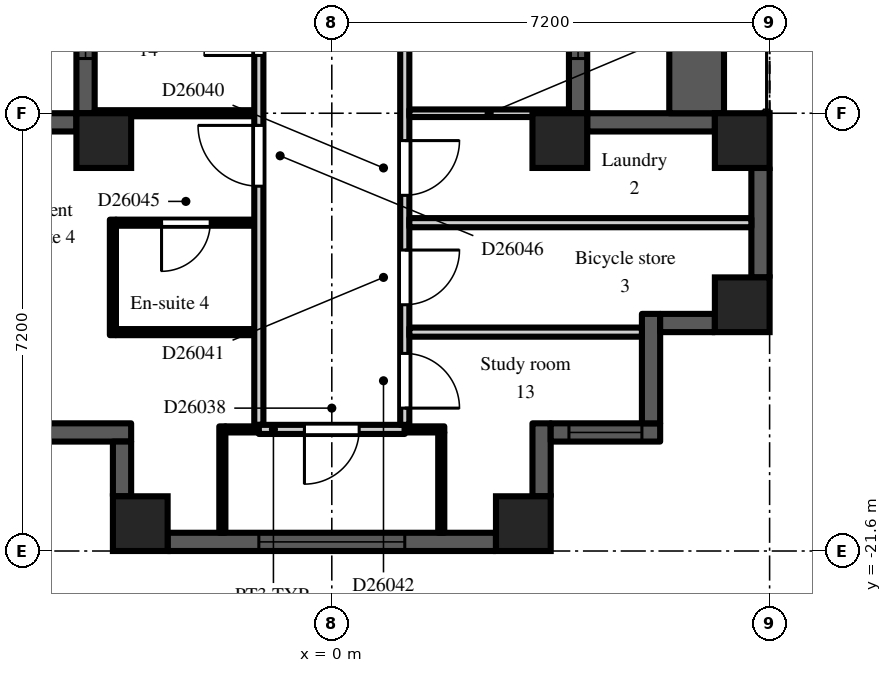
"""IFC4 building model, lengths in metres.
Left out: names, types, materials, properties, quantities, classifications, styles, units other than length and angle.
Written with IfcOpenShell. Run it as: python <this file> out.ifc"""

import sys

from ifc_helpers import new_model, si_unit, direction, frame, frame_2d, origin, origin_2d, place, context, subcontext, project, spatial, rectangle, extrude, element, fill, save


model = new_model("IFC4")
c1 = context("Model", 3, precision=1e-05, world=origin(), true_north=direction((0.0, 1.0)))
c2 = subcontext(c1, "Body", "Model", "MODEL_VIEW")
j1 = project(units=[si_unit("LENGTHUNIT", "METRE"), si_unit("PLANEANGLEUNIT", "RADIAN")], contexts=[c1])
p1 = place(None, origin())
s1 = spatial("IfcSite", under=j1, at=p1, CompositionType="ELEMENT")
p2 = place(p1, origin())
s2 = spatial("IfcBuilding", under=s1, at=p2, CompositionType="ELEMENT")
p3 = place(p2, frame((0.0, 0.0, 179.7)))
s3 = spatial("IfcBuildingStorey", under=s2, at=p3, CompositionType="ELEMENT", Elevation=179.7)
for number, where, z_axis, x_axis in (
    (1, (-3.75, -14.85, 0.0), (0.0, 0.0, 1.0), (1.0, 0.0, 0.0)),
    (2, (-3.15, -21.15, 0.0), (0.0, 0.0, 1.0), (1.0, 0.0, 0.0)),
    (3, (3.15, -21.15, 0.0), (0.0, 0.0, 1.0), (1.0, 0.0, 0.0)),
    (4, (3.75, -14.85, 0.0), (0.0, 0.0, 1.0), (1.0, 0.0, 0.0)),
    (5, (6.75, -17.55, 0.0), (0.0, 0.0, 1.0), (1.0, 0.0, 0.0)),
    (6, (6.75, -14.85, 0.0), (0.0, 0.0, 1.0), (1.0, 0.0, 0.0)),
):
    element("IfcColumn", number, at=place(p3, frame(where, z_axis=z_axis, x_axis=x_axis)), inside=s3, PredefinedType="COLUMN", context=c2, shape_type="SweptSolid", body=[
        extrude(rectangle(XDim=0.9, YDim=0.9, at=origin_2d()), origin(), (0.0, 0.0, 1.0), 3.0),
    ])
p4 = place(p3, frame((-4.05, -7.2, 0.0), z_axis=(0.0, 0.0, 1.0), x_axis=(0.0, -1.0, 0.0)))
e7 = element("IfcWall", 7, at=p4, inside=s3, PredefinedType="SOLIDWALL", context=c2, shape_type="SweptSolid", body=[
    extrude(rectangle(XDim=7.2, YDim=0.3, at=frame_2d((3.6, 0.0))), origin(), (0.0, 0.0, 1.0), 2.2),
])
p5 = place(p4, frame((3.0, 0.0, 0.0)))
e8 = element("IfcOpeningElement", 8, at=p5, cuts=e7, PredefinedType="OPENING", context=c2, shape_type="SweptSolid", body=[
    extrude(rectangle(XDim=1.2, YDim=2.05, at=frame_2d((0.6, 1.025))), frame((0.0, 0.16, 0.0), z_axis=(0.0, -1.0, 0.0), x_axis=(1.0, 0.0, 0.0)), (0.0, 0.0, 1.0), 0.32),
])
p6 = place(p4, frame((0.9, 0.0, 0.2)))
e9 = element("IfcOpeningElement", 9, at=p6, cuts=e7, PredefinedType="OPENING", context=c2, shape_type="SweptSolid", body=[
    extrude(rectangle(XDim=1.8, YDim=1.85, at=frame_2d((0.9, 0.925))), frame((0.0, 0.16, 0.0), z_axis=(0.0, -1.0, 0.0), x_axis=(1.0, 0.0, 0.0)), (0.0, 0.0, 1.0), 0.32),
])
p7 = place(p4, frame((4.5, 0.0, 0.2)))
e10 = element("IfcOpeningElement", 10, at=p7, cuts=e7, PredefinedType="OPENING", context=c2, shape_type="SweptSolid", body=[
    extrude(rectangle(XDim=1.8, YDim=1.85, at=frame_2d((0.9, 0.925))), frame((0.0, 0.16, 0.0), z_axis=(0.0, -1.0, 0.0), x_axis=(1.0, 0.0, 0.0)), (0.0, 0.0, 1.0), 0.32),
])
p8 = place(p3, frame((-4.2, -14.55, 0.0), z_axis=(0.0, 0.0, 1.0), x_axis=(-1.0, 0.0, 0.0)))
e11 = element("IfcWall", 11, at=p8, inside=s3, PredefinedType="SOLIDWALL", context=c2, shape_type="SweptSolid", body=[
    extrude(rectangle(XDim=2.1, YDim=0.3, at=frame_2d((1.05, 0.0))), origin(), (0.0, 0.0, 1.0), 2.2),
])
p9 = place(p3, frame((-5.1, -19.65, 0.0), z_axis=(0.0, 0.0, 1.0), x_axis=(1.0, 0.0, 0.0)))
e12 = element("IfcWall", 12, at=p9, inside=s3, PredefinedType="SOLIDWALL", context=c2, shape_type="SweptSolid", body=[
    extrude(rectangle(XDim=1.8, YDim=0.3, at=frame_2d((0.9, 0.0))), origin(), (0.0, 0.0, 1.0), 2.6),
])
p10 = place(p3, frame((-3.45, -19.8, 0.0), z_axis=(0.0, 0.0, 1.0), x_axis=(0.0, -1.0, 0.0)))
e13 = element("IfcWall", 13, at=p10, inside=s3, PredefinedType="SOLIDWALL", context=c2, shape_type="SweptSolid", body=[
    extrude(rectangle(XDim=0.9, YDim=0.3, at=frame_2d((0.45, 0.0))), origin(), (0.0, 0.0, 1.0), 2.6),
])
p11 = place(p3, frame((-2.7, -21.45, 0.0), z_axis=(0.0, 0.0, 1.0), x_axis=(1.0, 0.0, 0.0)))
e14 = element("IfcWall", 14, at=p11, inside=s3, PredefinedType="SOLIDWALL", context=c2, shape_type="SweptSolid", body=[
    extrude(rectangle(XDim=5.4, YDim=0.3, at=frame_2d((2.7, 0.0))), origin(), (0.0, 0.0, 1.0), 2.2),
])
p12 = place(p11, frame((1.5, 0.0, 0.2)))
e15 = element("IfcOpeningElement", 15, at=p12, cuts=e14, PredefinedType="OPENING", context=c2, shape_type="SweptSolid", body=[
    extrude(rectangle(XDim=2.4, YDim=1.85, at=frame_2d((1.2, 0.925))), frame((0.0, 0.16, 0.0), z_axis=(0.0, -1.0, 0.0), x_axis=(1.0, 0.0, 0.0)), (0.0, 0.0, 1.0), 0.32),
])
p13 = place(p3, frame((3.45, -20.7, 0.0), z_axis=(0.0, 0.0, 1.0), x_axis=(0.0, 1.0, 0.0)))
e16 = element("IfcWall", 16, at=p13, inside=s3, PredefinedType="SOLIDWALL", context=c2, shape_type="SweptSolid", body=[
    extrude(rectangle(XDim=1.2, YDim=0.3, at=frame_2d((0.6, 0.0))), origin(), (0.0, 0.0, 1.0), 2.6),
])
p14 = place(p3, frame((3.6, -19.65, 0.0), z_axis=(0.0, 0.0, 1.0), x_axis=(1.0, 0.0, 0.0)))
e17 = element("IfcWall", 17, at=p14, inside=s3, PredefinedType="SOLIDWALL", context=c2, shape_type="SweptSolid", body=[
    extrude(rectangle(XDim=1.8, YDim=0.3, at=frame_2d((0.9, 0.0))), origin(), (0.0, 0.0, 1.0), 2.6),
])
p15 = place(p14, frame((0.3, 0.0, 0.2)))
e18 = element("IfcOpeningElement", 18, at=p15, cuts=e17, PredefinedType="OPENING", context=c2, shape_type="SweptSolid", body=[
    extrude(rectangle(XDim=1.2, YDim=1.85, at=frame_2d((0.6, 0.925))), frame((0.0, 0.16, 0.0), z_axis=(0.0, -1.0, 0.0), x_axis=(1.0, 0.0, 0.0)), (0.0, 0.0, 1.0), 0.32),
])
p16 = place(p3, frame((5.25, -19.5, 0.0), z_axis=(0.0, 0.0, 1.0), x_axis=(0.0, 1.0, 0.0)))
e19 = element("IfcWall", 19, at=p16, inside=s3, PredefinedType="SOLIDWALL", context=c2, shape_type="SweptSolid", body=[
    extrude(rectangle(XDim=1.8, YDim=0.3, at=frame_2d((0.9, 0.0))), origin(), (0.0, 0.0, 1.0), 2.6),
])
p17 = place(p3, frame((5.4, -17.85, 0.0), z_axis=(0.0, 0.0, 1.0), x_axis=(1.0, 0.0, 0.0)))
e20 = element("IfcWall", 20, at=p17, inside=s3, PredefinedType="SOLIDWALL", context=c2, shape_type="SweptSolid", body=[
    extrude(rectangle(XDim=0.9, YDim=0.3, at=frame_2d((0.45, 0.0))), origin(), (0.0, 0.0, 1.0), 2.6),
])
p18 = place(p3, frame((7.05, -17.1, 0.0), z_axis=(0.0, 0.0, 1.0), x_axis=(0.0, 1.0, 0.0)))
e21 = element("IfcWall", 21, at=p18, inside=s3, PredefinedType="SOLIDWALL", context=c2, shape_type="SweptSolid", body=[
    extrude(rectangle(XDim=1.8, YDim=0.3, at=frame_2d((0.9, 0.0))), origin(), (0.0, 0.0, 1.0), 2.2),
])
p19 = place(p3, frame((6.3, -14.55, 0.0), z_axis=(0.0, 0.0, 1.0), x_axis=(-1.0, 0.0, 0.0)))
e22 = element("IfcWall", 22, at=p19, inside=s3, PredefinedType="SOLIDWALL", context=c2, shape_type="SweptSolid", body=[
    extrude(rectangle(XDim=2.1, YDim=0.3, at=frame_2d((1.05, 0.0))), origin(), (0.0, 0.0, 1.0), 2.2),
])
p20 = place(p3, frame((4.05, -14.4, 0.0), z_axis=(0.0, 0.0, 1.0), x_axis=(0.0, 1.0, 0.0)))
e23 = element("IfcWall", 23, at=p20, inside=s3, PredefinedType="SOLIDWALL", context=c2, shape_type="SweptSolid", body=[
    extrude(rectangle(XDim=7.2, YDim=0.3, at=frame_2d((3.6, 0.0))), origin(), (0.0, 0.0, 1.0), 2.2),
])
p21 = place(p20, frame((3.0, 0.0, 0.0)))
e24 = element("IfcOpeningElement", 24, at=p21, cuts=e23, PredefinedType="OPENING", context=c2, shape_type="SweptSolid", body=[
    extrude(rectangle(XDim=1.2, YDim=2.05, at=frame_2d((0.6, 1.025))), frame((0.0, 0.16, 0.0), z_axis=(0.0, -1.0, 0.0), x_axis=(1.0, 0.0, 0.0)), (0.0, 0.0, 1.0), 0.32),
])
p22 = place(p20, frame((0.9, 0.0, 0.2)))
e25 = element("IfcOpeningElement", 25, at=p22, cuts=e23, PredefinedType="OPENING", context=c2, shape_type="SweptSolid", body=[
    extrude(rectangle(XDim=1.8, YDim=1.85, at=frame_2d((0.9, 0.925))), frame((0.0, 0.16, 0.0), z_axis=(0.0, -1.0, 0.0), x_axis=(1.0, 0.0, 0.0)), (0.0, 0.0, 1.0), 0.32),
])
p23 = place(p20, frame((4.5, 0.0, 0.2)))
e26 = element("IfcOpeningElement", 26, at=p23, cuts=e23, PredefinedType="OPENING", context=c2, shape_type="SweptSolid", body=[
    extrude(rectangle(XDim=1.8, YDim=1.85, at=frame_2d((0.9, 0.925))), frame((0.0, 0.16, 0.0), z_axis=(0.0, -1.0, 0.0), x_axis=(1.0, 0.0, 0.0)), (0.0, 0.0, 1.0), 0.32),
])
p24 = place(p3, frame((6.0, -14.4, 0.0), z_axis=(0.0, 0.0, 1.0), x_axis=(0.0, 1.0, 0.0)))
e27 = element("IfcWall", 27, at=p24, inside=s3, PredefinedType="PARAPET", context=c2, shape_type="SweptSolid", body=[
    extrude(rectangle(XDim=7.2, YDim=0.9, at=frame_2d((3.6, 0.0))), origin(), (0.0, 0.0, 1.0), 0.8),
])
p25 = place(p3, frame((-3.9, -14.4, 0.0), z_axis=(0.0, 0.0, 1.0), x_axis=(1.0, 0.0, 0.0)))
e28 = element("IfcWall", 28, at=p25, inside=s3, PredefinedType="PARTITIONING", context=c2, shape_type="SweptSolid", body=[
    extrude(rectangle(XDim=2.625, YDim=0.1, at=frame_2d((1.312, 0.0))), origin(), (0.0, 0.0, 1.0), 2.6),
])
p26 = place(p3, frame((-3.6, -18.05, 0.0), z_axis=(0.0, 0.0, 1.0), x_axis=(0.0, 1.0, 0.0)))
e29 = element("IfcWall", 29, at=p26, inside=s3, PredefinedType="PARTITIONING", context=c2, shape_type="SweptSolid", body=[
    extrude(rectangle(XDim=1.9, YDim=0.1, at=frame_2d((0.95, 0.0))), origin(), (0.0, 0.0, 1.0), 2.6),
])
p27 = place(p3, frame((-3.55, -18.0, 0.0), z_axis=(0.0, 0.0, 1.0), x_axis=(1.0, 0.0, 0.0)))
e30 = element("IfcWall", 30, at=p27, inside=s3, PredefinedType="PARTITIONING", context=c2, shape_type="SweptSolid", body=[
    extrude(rectangle(XDim=2.275, YDim=0.1, at=frame_2d((1.138, 0.0))), origin(), (0.0, 0.0, 1.0), 2.6),
])
p28 = place(p3, frame((-3.55, -16.2, 0.0), z_axis=(0.0, 0.0, 1.0), x_axis=(1.0, 0.0, 0.0)))
e31 = element("IfcWall", 31, at=p28, inside=s3, PredefinedType="PARTITIONING", context=c2, shape_type="SweptSolid", body=[
    extrude(rectangle(XDim=2.275, YDim=0.1, at=frame_2d((1.138, 0.0))), origin(), (0.0, 0.0, 1.0), 2.6),
])
p29 = place(p28, frame((0.75, 0.0, 0.0)))
e32 = element("IfcOpeningElement", 32, at=p29, cuts=e31, PredefinedType="OPENING", context=c2, shape_type="SweptSolid", body=[
    extrude(rectangle(XDim=0.8, YDim=2.1, at=frame_2d((0.4, 1.05))), frame((0.0, 0.06, 0.0), z_axis=(0.0, -1.0, 0.0), x_axis=(1.0, 0.0, 0.0)), (0.0, 0.0, 1.0), 0.12),
])
p30 = place(p3, frame((-1.8, -21.3, 0.0), z_axis=(0.0, 0.0, 1.0), x_axis=(0.0, 1.0, 0.0)))
e33 = element("IfcWall", 33, at=p30, inside=s3, PredefinedType="PARTITIONING", context=c2, shape_type="SweptSolid", body=[
    extrude(rectangle(XDim=1.75, YDim=0.1, at=frame_2d((0.875, 0.0))), origin(), (0.0, 0.0, 1.0), 2.6),
])
p31 = place(p3, frame((-1.75, -19.6, 0.0), z_axis=(0.0, 0.0, 1.0), x_axis=(1.0, 0.0, 0.0)))
e34 = element("IfcWall", 34, at=p31, inside=s3, PredefinedType="PARTITIONING", context=c2, shape_type="SweptSolid", body=[
    extrude(rectangle(XDim=0.55, YDim=0.1, at=frame_2d((0.275, 0.0))), origin(), (0.0, 0.0, 1.0), 2.6),
])
p32 = place(p3, frame((-1.2, -19.525, 0.0), z_axis=(0.0, 0.0, 1.0), x_axis=(0.0, 1.0, 0.0)))
e35 = element("IfcWall", 35, at=p32, inside=s3, PredefinedType="PARTITIONING", context=c2, shape_type="SweptSolid", body=[
    extrude(rectangle(XDim=18.25, YDim=0.15, at=frame_2d((9.125, 0.0))), origin(), (0.0, 0.0, 1.0), 2.6),
])
p33 = place(p32, frame((14.875, 0.0, 0.0)))
e36 = element("IfcOpeningElement", 36, at=p33, cuts=e35, PredefinedType="OPENING", context=c2, shape_type="SweptSolid", body=[
    extrude(rectangle(XDim=0.9, YDim=2.1, at=frame_2d((0.45, 1.05))), frame((0.0, 0.085, 0.0), z_axis=(0.0, -1.0, 0.0), x_axis=(1.0, 0.0, 0.0)), (0.0, 0.0, 1.0), 0.17),
])
p34 = place(p32, frame((6.075, 0.0, 0.0)))
e37 = element("IfcOpeningElement", 37, at=p34, cuts=e35, PredefinedType="OPENING", context=c2, shape_type="SweptSolid", body=[
    extrude(rectangle(XDim=0.9, YDim=2.1, at=frame_2d((0.45, 1.05))), frame((0.0, 0.085, 0.0), z_axis=(0.0, -1.0, 0.0), x_axis=(1.0, 0.0, 0.0)), (0.0, 0.0, 1.0), 0.17),
])
p35 = place(p32, frame((9.675, 0.0, 0.0)))
e38 = element("IfcOpeningElement", 38, at=p35, cuts=e35, PredefinedType="OPENING", context=c2, shape_type="SweptSolid", body=[
    extrude(rectangle(XDim=0.9, YDim=2.1, at=frame_2d((0.45, 1.05))), frame((0.0, 0.085, 0.0), z_axis=(0.0, -1.0, 0.0), x_axis=(1.0, 0.0, 0.0)), (0.0, 0.0, 1.0), 0.17),
])
p36 = place(p32, frame((3.925, 0.0, 0.0)))
e39 = element("IfcOpeningElement", 39, at=p36, cuts=e35, PredefinedType="OPENING", context=c2, shape_type="SweptSolid", body=[
    extrude(rectangle(XDim=1.0, YDim=2.1, at=frame_2d((0.5, 1.05))), frame((0.0, 0.085, 0.0), z_axis=(0.0, -1.0, 0.0), x_axis=(1.0, 0.0, 0.0)), (0.0, 0.0, 1.0), 0.17),
])
p37 = place(p3, frame((-1.2, -19.6, 0.0), z_axis=(0.0, 0.0, 1.0), x_axis=(1.0, 0.0, 0.0)))
e40 = element("IfcWall", 40, at=p37, inside=s3, PredefinedType="PARTITIONING", context=c2, shape_type="SweptSolid", body=[
    extrude(rectangle(XDim=2.4, YDim=0.15, at=frame_2d((1.2, 0.0))), origin(), (0.0, 0.0, 1.0), 2.6),
])
p38 = place(p37, frame((0.75, 0.0, 0.0)))
e41 = element("IfcOpeningElement", 41, at=p38, cuts=e40, PredefinedType="OPENING", context=c2, shape_type="SweptSolid", body=[
    extrude(rectangle(XDim=0.9, YDim=2.1, at=frame_2d((0.45, 1.05))), frame((0.0, 0.085, 0.0), z_axis=(0.0, -1.0, 0.0), x_axis=(1.0, 0.0, 0.0)), (0.0, 0.0, 1.0), 0.17),
])
p39 = place(p3, frame((1.2, -19.525, 0.0), z_axis=(0.0, 0.0, 1.0), x_axis=(0.0, 1.0, 0.0)))
e42 = element("IfcWall", 42, at=p39, inside=s3, PredefinedType="PARTITIONING", context=c2, shape_type="SweptSolid", body=[
    extrude(rectangle(XDim=18.4, YDim=0.15, at=frame_2d((9.2, 0.0))), origin(), (0.0, 0.0, 1.0), 2.6),
])
p40 = place(p39, frame((14.875, 0.0, 0.0)))
e43 = element("IfcOpeningElement", 43, at=p40, cuts=e42, PredefinedType="OPENING", context=c2, shape_type="SweptSolid", body=[
    extrude(rectangle(XDim=0.9, YDim=2.1, at=frame_2d((0.45, 1.05))), frame((0.0, 0.085, 0.0), z_axis=(0.0, -1.0, 0.0), x_axis=(1.0, 0.0, 0.0)), (0.0, 0.0, 1.0), 0.17),
])
p41 = place(p39, frame((6.475, 0.0, 0.0)))
e44 = element("IfcOpeningElement", 44, at=p41, cuts=e42, PredefinedType="OPENING", context=c2, shape_type="SweptSolid", body=[
    extrude(rectangle(XDim=0.9, YDim=2.1, at=frame_2d((0.45, 1.05))), frame((0.0, 0.085, 0.0), z_axis=(0.0, -1.0, 0.0), x_axis=(1.0, 0.0, 0.0)), (0.0, 0.0, 1.0), 0.17),
])
p42 = place(p39, frame((3.775, 0.0, 0.0)))
e45 = element("IfcOpeningElement", 45, at=p42, cuts=e42, PredefinedType="OPENING", context=c2, shape_type="SweptSolid", body=[
    extrude(rectangle(XDim=0.9, YDim=2.1, at=frame_2d((0.45, 1.05))), frame((0.0, 0.085, 0.0), z_axis=(0.0, -1.0, 0.0), x_axis=(1.0, 0.0, 0.0)), (0.0, 0.0, 1.0), 0.17),
])
p43 = place(p39, frame((1.975, 0.0, 0.0)))
e46 = element("IfcOpeningElement", 46, at=p43, cuts=e42, PredefinedType="OPENING", context=c2, shape_type="SweptSolid", body=[
    extrude(rectangle(XDim=0.9, YDim=2.1, at=frame_2d((0.45, 1.05))), frame((0.0, 0.085, 0.0), z_axis=(0.0, -1.0, 0.0), x_axis=(1.0, 0.0, 0.0)), (0.0, 0.0, 1.0), 0.17),
])
p44 = place(p39, frame((0.275, 0.0, 0.0)))
e47 = element("IfcOpeningElement", 47, at=p44, cuts=e42, PredefinedType="OPENING", context=c2, shape_type="SweptSolid", body=[
    extrude(rectangle(XDim=0.9, YDim=2.1, at=frame_2d((0.45, 1.05))), frame((0.0, 0.085, 0.0), z_axis=(0.0, -1.0, 0.0), x_axis=(1.0, 0.0, 0.0)), (0.0, 0.0, 1.0), 0.17),
])
p45 = place(p3, frame((1.2, -19.6, 0.0), z_axis=(0.0, 0.0, 1.0), x_axis=(1.0, 0.0, 0.0)))
e48 = element("IfcWall", 48, at=p45, inside=s3, PredefinedType="PARTITIONING", context=c2, shape_type="SweptSolid", body=[
    extrude(rectangle(XDim=0.65, YDim=0.1, at=frame_2d((0.325, 0.0))), origin(), (0.0, 0.0, 1.0), 2.6),
])
p46 = place(p3, frame((1.275, -18.0, 0.0), z_axis=(0.0, 0.0, 1.0), x_axis=(1.0, 0.0, 0.0)))
e49 = element("IfcWall", 49, at=p46, inside=s3, PredefinedType="PARTITIONING", context=c2, shape_type="SweptSolid", body=[
    extrude(rectangle(XDim=3.825, YDim=0.15, at=frame_2d((1.913, 0.0))), origin(), (0.0, 0.0, 1.0), 2.6),
])
p47 = place(p3, frame((1.275, -16.2, 0.0), z_axis=(0.0, 0.0, 1.0), x_axis=(1.0, 0.0, 0.0)))
e50 = element("IfcWall", 50, at=p47, inside=s3, PredefinedType="PARTITIONING", context=c2, shape_type="SweptSolid", body=[
    extrude(rectangle(XDim=5.625, YDim=0.15, at=frame_2d((2.812, 0.0))), origin(), (0.0, 0.0, 1.0), 2.6),
])
p48 = place(p3, frame((1.275, -14.4, 0.0), z_axis=(0.0, 0.0, 1.0), x_axis=(1.0, 0.0, 0.0)))
e51 = element("IfcWall", 51, at=p48, inside=s3, PredefinedType="PARTITIONING", context=c2, shape_type="SweptSolid", body=[
    extrude(rectangle(XDim=2.625, YDim=0.125, at=frame_2d((1.312, 0.0))), origin(), (0.0, 0.0, 1.0), 2.6),
])
p49 = place(p3, frame((1.8, -21.3, 0.0), z_axis=(0.0, 0.0, 1.0), x_axis=(0.0, 1.0, 0.0)))
e52 = element("IfcWall", 52, at=p49, inside=s3, PredefinedType="PARTITIONING", context=c2, shape_type="SweptSolid", body=[
    extrude(rectangle(XDim=1.65, YDim=0.1, at=frame_2d((0.825, 0.0))), origin(), (0.0, 0.0, 1.0), 2.6),
])
p50 = place(p7, origin())
e53 = element("IfcWindow", 53, at=p50, inside=s3, PartitioningType="SINGLE_PANEL", PredefinedType="WINDOW", context=c2, shape_type="SweptSolid", body=[
    extrude(rectangle(XDim=1.8, YDim=1.85, at=frame_2d((0.9, 0.925))), frame((0.0, 0.03, 0.0), z_axis=(0.0, -1.0, 0.0), x_axis=(1.0, 0.0, 0.0)), (0.0, 0.0, 1.0), 0.06),
])
fill(e10, e53)
p51 = place(p12, origin())
e54 = element("IfcWindow", 54, at=p51, inside=s3, PartitioningType="SINGLE_PANEL", PredefinedType="WINDOW", context=c2, shape_type="SweptSolid", body=[
    extrude(rectangle(XDim=2.4, YDim=1.85, at=frame_2d((1.2, 0.925))), frame((0.0, 0.03, 0.0), z_axis=(0.0, -1.0, 0.0), x_axis=(1.0, 0.0, 0.0)), (0.0, 0.0, 1.0), 0.06),
])
fill(e15, e54)
p52 = place(p15, origin())
e55 = element("IfcWindow", 55, at=p52, inside=s3, PartitioningType="SINGLE_PANEL", PredefinedType="WINDOW", context=c2, shape_type="SweptSolid", body=[
    extrude(rectangle(XDim=1.2, YDim=1.85, at=frame_2d((0.6, 0.925))), frame((0.0, 0.03, 0.0), z_axis=(0.0, -1.0, 0.0), x_axis=(1.0, 0.0, 0.0)), (0.0, 0.0, 1.0), 0.06),
])
fill(e18, e55)
p53 = place(p22, origin())
e56 = element("IfcWindow", 56, at=p53, inside=s3, PartitioningType="SINGLE_PANEL", PredefinedType="WINDOW", context=c2, shape_type="SweptSolid", body=[
    extrude(rectangle(XDim=1.8, YDim=1.85, at=frame_2d((0.9, 0.925))), frame((0.0, 0.03, 0.0), z_axis=(0.0, -1.0, 0.0), x_axis=(1.0, 0.0, 0.0)), (0.0, 0.0, 1.0), 0.06),
])
fill(e25, e56)
p54 = place(p38, frame((0.9, 0.0, 0.0), z_axis=(0.0, 0.0, 1.0), x_axis=(-1.0, 0.0, 0.0)))
e57 = element("IfcDoor", 57, at=p54, inside=s3, OperationType="SINGLE_SWING_RIGHT", PredefinedType="DOOR", context=c2, shape_type="SweptSolid", body=[
    extrude(rectangle(XDim=0.9, YDim=2.1, at=frame_2d((0.45, 1.05))), frame((0.0, 0.025, 0.0), z_axis=(0.0, -1.0, 0.0), x_axis=(1.0, 0.0, 0.0)), (0.0, 0.0, 1.0), 0.05),
])
fill(e41, e57)
p55 = place(p42, frame((0.9, 0.0, 0.0), z_axis=(0.0, 0.0, 1.0), x_axis=(-1.0, 0.0, 0.0)))
e58 = element("IfcDoor", 58, at=p55, inside=s3, OperationType="SINGLE_SWING_LEFT", PredefinedType="DOOR", context=c2, shape_type="SweptSolid", body=[
    extrude(rectangle(XDim=0.9, YDim=2.1, at=frame_2d((0.45, 1.05))), frame((0.0, 0.025, 0.0), z_axis=(0.0, -1.0, 0.0), x_axis=(1.0, 0.0, 0.0)), (0.0, 0.0, 1.0), 0.05),
])
fill(e45, e58)
p56 = place(p43, frame((0.9, 0.0, 0.0), z_axis=(0.0, 0.0, 1.0), x_axis=(-1.0, 0.0, 0.0)))
e59 = element("IfcDoor", 59, at=p56, inside=s3, OperationType="SINGLE_SWING_LEFT", PredefinedType="DOOR", context=c2, shape_type="SweptSolid", body=[
    extrude(rectangle(XDim=0.9, YDim=2.1, at=frame_2d((0.45, 1.05))), frame((0.0, 0.025, 0.0), z_axis=(0.0, -1.0, 0.0), x_axis=(1.0, 0.0, 0.0)), (0.0, 0.0, 1.0), 0.05),
])
fill(e46, e59)
p57 = place(p44, frame((0.9, 0.0, 0.0), z_axis=(0.0, 0.0, 1.0), x_axis=(-1.0, 0.0, 0.0)))
e60 = element("IfcDoor", 60, at=p57, inside=s3, OperationType="SINGLE_SWING_RIGHT", PredefinedType="DOOR", context=c2, shape_type="SweptSolid", body=[
    extrude(rectangle(XDim=0.9, YDim=2.1, at=frame_2d((0.45, 1.05))), frame((0.0, 0.025, 0.0), z_axis=(0.0, -1.0, 0.0), x_axis=(1.0, 0.0, 0.0)), (0.0, 0.0, 1.0), 0.05),
])
fill(e47, e60)
p58 = place(p34, origin())
e61 = element("IfcDoor", 61, at=p58, inside=s3, OperationType="SINGLE_SWING_LEFT", PredefinedType="DOOR", context=c2, shape_type="SweptSolid", body=[
    extrude(rectangle(XDim=0.9, YDim=2.1, at=frame_2d((0.45, 1.05))), frame((0.0, 0.025, 0.0), z_axis=(0.0, -1.0, 0.0), x_axis=(1.0, 0.0, 0.0)), (0.0, 0.0, 1.0), 0.05),
])
fill(e37, e61)
p59 = place(p29, frame((0.8, 0.0, 0.0), z_axis=(0.0, 0.0, 1.0), x_axis=(-1.0, 0.0, 0.0)))
e62 = element("IfcDoor", 62, at=p59, inside=s3, OperationType="SINGLE_SWING_RIGHT", PredefinedType="DOOR", context=c2, shape_type="SweptSolid", body=[
    extrude(rectangle(XDim=0.8, YDim=2.1, at=frame_2d((0.4, 1.05))), frame((0.0, 0.025, 0.0), z_axis=(0.0, -1.0, 0.0), x_axis=(1.0, 0.0, 0.0)), (0.0, 0.0, 1.0), 0.05),
])
fill(e32, e62)
p60 = place(p36, origin())
e63 = element("IfcDoor", 63, at=p60, inside=s3, OperationType="SINGLE_SWING_RIGHT", PredefinedType="DOOR", context=c2, shape_type="SweptSolid", body=[
    extrude(rectangle(XDim=1.0, YDim=2.1, at=frame_2d((0.5, 1.05))), frame((0.0, 0.025, 0.0), z_axis=(0.0, -1.0, 0.0), x_axis=(1.0, 0.0, 0.0)), (0.0, 0.0, 1.0), 0.05),
])
fill(e39, e63)
save(model, sys.argv[1])
